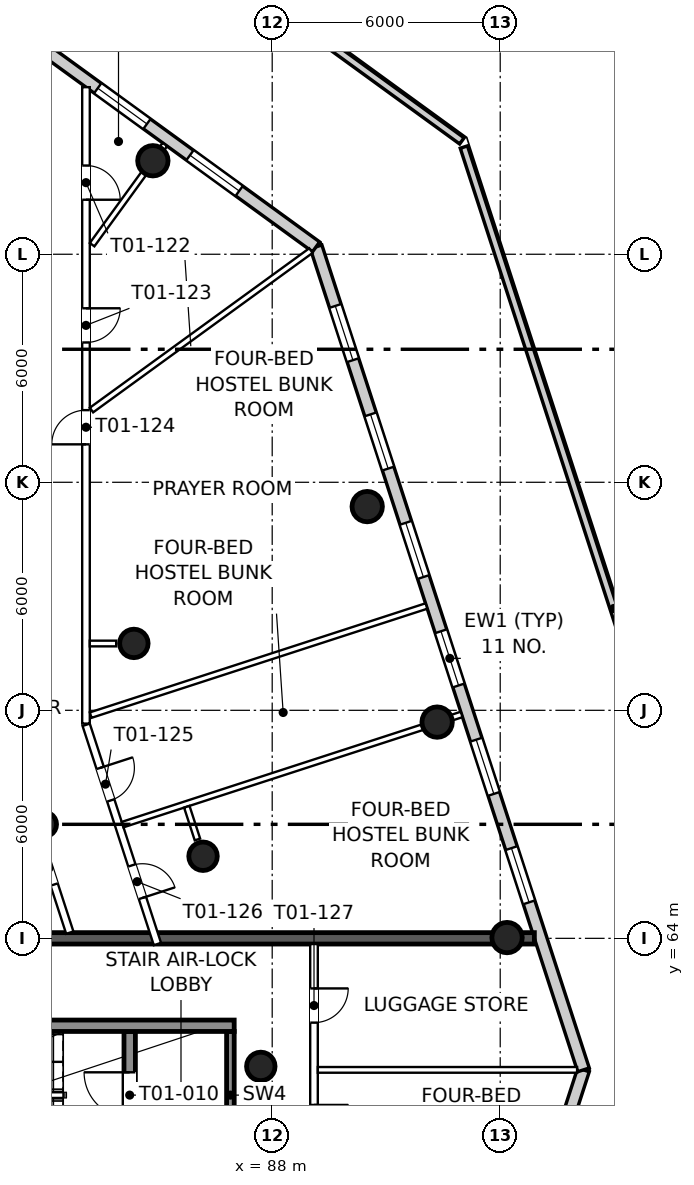
"""IFC4 building model, lengths in metres.
Left out: names, types, materials, properties, quantities, classifications, styles, units other than length and angle.
Written with IfcOpenShell. Run it as: python <this file> out.ifc"""

import sys

from ifc_helpers import new_model, si_unit, direction, frame, frame_2d, origin, origin_2d, place, context, subcontext, project, spatial, rectangle, circle, extrude, element, fill, save


model = new_model("IFC4")
c1 = context("Model", 3, precision=1e-05, world=origin(), true_north=direction((0.0, 1.0)))
c2 = subcontext(c1, "Body", "Model", "MODEL_VIEW")
j1 = project(units=[si_unit("LENGTHUNIT", "METRE"), si_unit("PLANEANGLEUNIT", "RADIAN")], contexts=[c1])
p1 = place(None, origin())
s1 = spatial("IfcSite", under=j1, at=p1, CompositionType="ELEMENT")
p2 = place(p1, origin())
s2 = spatial("IfcBuilding", under=s1, at=p2, CompositionType="ELEMENT")
p3 = place(p2, frame((0.0, 0.0, 39.0)))
s3 = spatial("IfcBuildingStorey", under=s2, at=p3, CompositionType="ELEMENT", Elevation=39.0)
for number, where, z_axis, x_axis in (
    (1, (94.18, 64.02, 0.0), (0.0, 0.0, 1.0), (1.0, 0.0, 0.0)),
    (2, (92.34, 69.69, 0.0), (0.0, 0.0, 1.0), (1.0, 0.0, 0.0)),
    (3, (90.5, 75.36, 0.0), (0.0, 0.0, 1.0), (1.0, 0.0, 0.0)),
    (4, (84.86, 84.46, 0.0), (0.0, 0.0, 1.0), (1.0, 0.0, 0.0)),
):
    element("IfcColumn", number, at=place(p3, frame(where, z_axis=z_axis, x_axis=x_axis)), inside=s3, PredefinedType="COLUMN", context=c2, shape_type="SweptSolid", body=[
        extrude(circle(Radius=0.4, at=origin_2d()), origin(), (0.0, 0.0, 1.0), 3.9),
    ])
for number, where, z_axis, x_axis in (
    (5, (87.7, 60.63, 0.0), (0.0, 0.0, 1.0), (1.0, 0.0, 0.0)),
    (6, (86.18, 66.16, 0.0), (0.0, 0.0, 1.0), (1.0, 0.0, 0.0)),
    (7, (84.36, 71.76, 0.0), (0.0, 0.0, 1.0), (1.0, 0.0, 0.0)),
):
    element("IfcColumn", number, at=place(p3, frame(where, z_axis=z_axis, x_axis=x_axis)), inside=s3, PredefinedType="COLUMN", context=c2, shape_type="SweptSolid", body=[
        extrude(circle(Radius=0.375, at=origin_2d()), origin(), (0.0, 0.0, 1.0), 3.9),
    ])
p4 = place(p3, frame((82.0, 67.0, 0.0), z_axis=(0.0, 0.0, 1.0), x_axis=(1.0, 0.0, 0.0)))
e8 = element("IfcColumn", 8, at=p4, inside=s3, PredefinedType="COLUMN", context=c2, shape_type="SweptSolid", body=[
    extrude(circle(Radius=0.325, at=origin_2d()), origin(), (0.0, 0.0, 1.0), 3.9),
])
p5 = place(p3, frame((93.223, 51.405, 0.0), z_axis=(0.0, 0.0, 1.0), x_axis=(0.309034915099, 0.951050693312, 0.0)))
e9 = element("IfcWall", 9, at=p5, inside=s3, PredefinedType="SOLIDWALL", context=c2, shape_type="SweptSolid", body=[
    extrude(rectangle(XDim=9.604, YDim=0.32, at=frame_2d((4.802, 0.0))), origin(), (0.0, 0.0, 1.0), 3.6),
])
p6 = place(p5, frame((2.502, 0.0, 0.9)))
e10 = element("IfcOpeningElement", 10, at=p6, cuts=e9, PredefinedType="OPENING", context=c2, shape_type="SweptSolid", body=[
    extrude(rectangle(XDim=1.6, YDim=1.8, at=frame_2d((0.8, 0.9))), frame((0.0, 0.17, 0.0), z_axis=(0.0, -1.0, 0.0), x_axis=(1.0, 0.0, 0.0)), (0.0, 0.0, 1.0), 0.34),
])
p7 = place(p5, frame((5.502, 0.0, 0.9)))
e11 = element("IfcOpeningElement", 11, at=p7, cuts=e9, PredefinedType="OPENING", context=c2, shape_type="SweptSolid", body=[
    extrude(rectangle(XDim=1.6, YDim=1.8, at=frame_2d((0.8, 0.9))), frame((0.0, 0.17, 0.0), z_axis=(0.0, -1.0, 0.0), x_axis=(1.0, 0.0, 0.0)), (0.0, 0.0, 1.0), 0.34),
])
p8 = place(p3, frame((96.191, 60.539, 0.0), z_axis=(0.0, 0.0, 1.0), x_axis=(-0.309016733543, 0.951056601045, 0.0)))
e12 = element("IfcWall", 12, at=p8, inside=s3, PredefinedType="SOLIDWALL", context=c2, shape_type="SweptSolid", body=[
    extrude(rectangle(XDim=22.77, YDim=0.32, at=frame_2d((11.385, 0.0))), origin(), (0.0, 0.0, 1.0), 3.6),
])
p9 = place(p8, frame((4.635, 0.0, 0.9)))
e13 = element("IfcOpeningElement", 13, at=p9, cuts=e12, PredefinedType="OPENING", context=c2, shape_type="SweptSolid", body=[
    extrude(rectangle(XDim=1.5, YDim=1.8, at=frame_2d((0.75, 0.9))), frame((0.0, 0.17, 0.0), z_axis=(0.0, -1.0, 0.0), x_axis=(1.0, 0.0, 0.0)), (0.0, 0.0, 1.0), 0.34),
])
p10 = place(p8, frame((7.635, 0.0, 0.9)))
e14 = element("IfcOpeningElement", 14, at=p10, cuts=e12, PredefinedType="OPENING", context=c2, shape_type="SweptSolid", body=[
    extrude(rectangle(XDim=1.5, YDim=1.8, at=frame_2d((0.75, 0.9))), frame((0.0, 0.17, 0.0), z_axis=(0.0, -1.0, 0.0), x_axis=(1.0, 0.0, 0.0)), (0.0, 0.0, 1.0), 0.34),
])
p11 = place(p8, frame((10.635, 0.0, 0.9)))
e15 = element("IfcOpeningElement", 15, at=p11, cuts=e12, PredefinedType="OPENING", context=c2, shape_type="SweptSolid", body=[
    extrude(rectangle(XDim=1.5, YDim=1.8, at=frame_2d((0.75, 0.9))), frame((0.0, 0.17, 0.0), z_axis=(0.0, -1.0, 0.0), x_axis=(1.0, 0.0, 0.0)), (0.0, 0.0, 1.0), 0.34),
])
p12 = place(p8, frame((13.635, 0.0, 0.9)))
e16 = element("IfcOpeningElement", 16, at=p12, cuts=e12, PredefinedType="OPENING", context=c2, shape_type="SweptSolid", body=[
    extrude(rectangle(XDim=1.5, YDim=1.8, at=frame_2d((0.75, 0.9))), frame((0.0, 0.17, 0.0), z_axis=(0.0, -1.0, 0.0), x_axis=(1.0, 0.0, 0.0)), (0.0, 0.0, 1.0), 0.34),
])
p13 = place(p8, frame((16.635, 0.0, 0.9)))
e17 = element("IfcOpeningElement", 17, at=p13, cuts=e12, PredefinedType="OPENING", context=c2, shape_type="SweptSolid", body=[
    extrude(rectangle(XDim=1.5, YDim=1.8, at=frame_2d((0.75, 0.9))), frame((0.0, 0.17, 0.0), z_axis=(0.0, -1.0, 0.0), x_axis=(1.0, 0.0, 0.0)), (0.0, 0.0, 1.0), 0.34),
])
p14 = place(p8, frame((19.635, 0.0, 0.9)))
e18 = element("IfcOpeningElement", 18, at=p14, cuts=e12, PredefinedType="OPENING", context=c2, shape_type="SweptSolid", body=[
    extrude(rectangle(XDim=1.5, YDim=1.8, at=frame_2d((0.75, 0.9))), frame((0.0, 0.17, 0.0), z_axis=(0.0, -1.0, 0.0), x_axis=(1.0, 0.0, 0.0)), (0.0, 0.0, 1.0), 0.34),
])
p15 = place(p3, frame((89.155, 82.195, 0.0), z_axis=(0.0, 0.0, 1.0), x_axis=(-0.809016299274, 0.587786209015, 0.0)))
e19 = element("IfcWall", 19, at=p15, inside=s3, PredefinedType="SOLIDWALL", context=c2, shape_type="SweptSolid", body=[
    extrude(rectangle(XDim=9.604, YDim=0.32, at=frame_2d((4.802, 0.0))), origin(), (0.0, 0.0, 1.0), 3.6),
])
p16 = place(p15, frame((2.502, 0.0, 0.9)))
e20 = element("IfcOpeningElement", 20, at=p16, cuts=e19, PredefinedType="OPENING", context=c2, shape_type="SweptSolid", body=[
    extrude(rectangle(XDim=1.6, YDim=1.8, at=frame_2d((0.8, 0.9))), frame((0.0, 0.17, 0.0), z_axis=(0.0, -1.0, 0.0), x_axis=(1.0, 0.0, 0.0)), (0.0, 0.0, 1.0), 0.34),
])
p17 = place(p15, frame((5.502, 0.0, 0.9)))
e21 = element("IfcOpeningElement", 21, at=p17, cuts=e19, PredefinedType="OPENING", context=c2, shape_type="SweptSolid", body=[
    extrude(rectangle(XDim=1.6, YDim=1.8, at=frame_2d((0.8, 0.9))), frame((0.0, 0.17, 0.0), z_axis=(0.0, -1.0, 0.0), x_axis=(1.0, 0.0, 0.0)), (0.0, 0.0, 1.0), 0.34),
])
p18 = place(p3, frame((100.933, 60.539, 0.0), z_axis=(0.0, 0.0, 1.0), x_axis=(-0.309020010983, -0.951055536134, 0.0)))
e22 = element("IfcWall", 22, at=p18, inside=s3, PredefinedType="SOLIDWALL", context=c2, shape_type="SweptSolid", body=[
    extrude(rectangle(XDim=12.535, YDim=0.2, at=frame_2d((6.268, 0.0))), origin(), (0.0, 0.0, 1.0), 1.1),
])
p19 = place(p3, frame((89.182, 87.75, 0.0), z_axis=(0.0, 0.0, 1.0), x_axis=(0.809016245047, -0.587786283652, 0.0)))
e23 = element("IfcWall", 23, at=p19, inside=s3, PredefinedType="SOLIDWALL", context=c2, shape_type="SweptSolid", body=[
    extrude(rectangle(XDim=4.709, YDim=0.2, at=frame_2d((2.354, 0.0))), origin(), (0.0, 0.0, 1.0), 1.1),
])
p20 = place(p3, frame((93.044, 84.82, 0.0), z_axis=(0.0, 0.0, 1.0), x_axis=(0.309015149374, -0.95105711577, 0.0)))
e24 = element("IfcWall", 24, at=p20, inside=s3, PredefinedType="SOLIDWALL", context=c2, shape_type="SweptSolid", body=[
    extrude(rectangle(XDim=25.531, YDim=0.2, at=frame_2d((12.765, 0.0))), origin(), (0.0, 0.0, 1.0), 1.1),
])
p21 = place(p3, frame((84.25, 58.2, 0.0), z_axis=(0.0, 0.0, 1.0), x_axis=(0.0, 1.0, 0.0)))
e25 = element("IfcWall", 25, at=p21, inside=s3, PredefinedType="SHEAR", context=c2, shape_type="SweptSolid", body=[
    extrude(rectangle(XDim=3.35, YDim=0.3, at=frame_2d((1.675, 0.0))), origin(), (0.0, 0.0, 1.0), 3.9),
])
p22 = place(p21, frame((1.075, 0.0, 0.0)))
e26 = element("IfcOpeningElement", 26, at=p22, cuts=e25, PredefinedType="OPENING", context=c2, shape_type="SweptSolid", body=[
    extrude(rectangle(XDim=1.2, YDim=2.1, at=frame_2d((0.6, 1.05))), frame((0.0, 0.16, 0.0), z_axis=(0.0, -1.0, 0.0), x_axis=(1.0, 0.0, 0.0)), (0.0, 0.0, 1.0), 0.32),
])
p23 = place(p3, frame((86.9, 58.2, 0.0), z_axis=(0.0, 0.0, 1.0), x_axis=(0.0, 1.0, 0.0)))
e27 = element("IfcWall", 27, at=p23, inside=s3, PredefinedType="SHEAR", context=c2, shape_type="SweptSolid", body=[
    extrude(rectangle(XDim=3.35, YDim=0.2, at=frame_2d((1.675, 0.0))), origin(), (0.0, 0.0, 1.0), 3.9),
])
p24 = place(p3, frame((75.1, 61.7, 0.0), z_axis=(0.0, 0.0, 1.0), x_axis=(1.0, 0.0, 0.0)))
e28 = element("IfcWall", 28, at=p24, inside=s3, PredefinedType="SHEAR", context=c2, shape_type="SweptSolid", body=[
    extrude(rectangle(XDim=11.9, YDim=0.3, at=frame_2d((5.95, 0.0))), origin(), (0.0, 0.0, 1.0), 3.9),
])
p25 = place(p3, frame((45.101, 64.0, 0.0), z_axis=(0.0, 0.0, 1.0), x_axis=(1.0, 0.0, 0.0)))
e29 = element("IfcWall", 29, at=p25, inside=s3, PredefinedType="PARTITIONING", context=c2, shape_type="SweptSolid", body=[
    extrude(rectangle(XDim=49.797, YDim=0.3, at=frame_2d((24.899, 0.0))), origin(), (0.0, 0.0, 1.0), 2.9),
])
p26 = place(p25, frame((16.433, 0.0, 0.0)))
e30 = element("IfcOpeningElement", 30, at=p26, cuts=e29, PredefinedType="OPENING", context=c2, shape_type="SweptSolid", body=[
    extrude(rectangle(XDim=2.0, YDim=2.1, at=frame_2d((1.0, 1.05))), frame((0.0, 0.16, 0.0), z_axis=(0.0, -1.0, 0.0), x_axis=(1.0, 0.0, 0.0)), (0.0, 0.0, 1.0), 0.32),
])
p27 = place(p25, frame((31.364, 0.0, 0.0)))
e31 = element("IfcOpeningElement", 31, at=p27, cuts=e29, PredefinedType="OPENING", context=c2, shape_type="SweptSolid", body=[
    extrude(rectangle(XDim=2.0, YDim=2.1, at=frame_2d((1.0, 1.05))), frame((0.0, 0.16, 0.0), z_axis=(0.0, -1.0, 0.0), x_axis=(1.0, 0.0, 0.0)), (0.0, 0.0, 1.0), 0.32),
])
p28 = place(p3, frame((83.1, 86.396, 0.0), z_axis=(0.0, 0.0, 1.0), x_axis=(0.0, -1.0, 0.0)))
e32 = element("IfcWall", 32, at=p28, inside=s3, PredefinedType="PARTITIONING", context=c2, shape_type="SweptSolid", body=[
    extrude(rectangle(XDim=16.746, YDim=0.2, at=frame_2d((8.373, 0.0))), origin(), (0.0, 0.0, 1.0), 3.0),
])
p29 = place(p28, frame((2.062, 0.0, 0.0)))
e33 = element("IfcOpeningElement", 33, at=p29, cuts=e32, PredefinedType="OPENING", context=c2, shape_type="SweptSolid", body=[
    extrude(rectangle(XDim=0.9, YDim=2.1, at=frame_2d((0.45, 1.05))), frame((0.0, 0.11, 0.0), z_axis=(0.0, -1.0, 0.0), x_axis=(1.0, 0.0, 0.0)), (0.0, 0.0, 1.0), 0.22),
])
p30 = place(p28, frame((5.818, 0.0, 0.0)))
e34 = element("IfcOpeningElement", 34, at=p30, cuts=e32, PredefinedType="OPENING", context=c2, shape_type="SweptSolid", body=[
    extrude(rectangle(XDim=0.9, YDim=2.1, at=frame_2d((0.45, 1.05))), frame((0.0, 0.11, 0.0), z_axis=(0.0, -1.0, 0.0), x_axis=(1.0, 0.0, 0.0)), (0.0, 0.0, 1.0), 0.22),
])
p31 = place(p28, frame((8.498, 0.0, 0.0)))
e35 = element("IfcOpeningElement", 35, at=p31, cuts=e32, PredefinedType="OPENING", context=c2, shape_type="SweptSolid", body=[
    extrude(rectangle(XDim=0.9, YDim=2.1, at=frame_2d((0.45, 1.05))), frame((0.0, 0.11, 0.0), z_axis=(0.0, -1.0, 0.0), x_axis=(1.0, 0.0, 0.0)), (0.0, 0.0, 1.0), 0.22),
])
p32 = place(p3, frame((83.105, 69.619, 0.0), z_axis=(0.0, 0.0, 1.0), x_axis=(0.309010538589, -0.951058613883, 0.0)))
e36 = element("IfcWall", 36, at=p32, inside=s3, PredefinedType="PARTITIONING", context=c2, shape_type="SweptSolid", body=[
    extrude(rectangle(XDim=6.066, YDim=0.2, at=frame_2d((3.033, 0.0))), origin(), (0.0, 0.0, 1.0), 3.6),
])
p33 = place(p32, frame((1.193, 0.0, 0.0)))
e37 = element("IfcOpeningElement", 37, at=p33, cuts=e36, PredefinedType="OPENING", context=c2, shape_type="SweptSolid", body=[
    extrude(rectangle(XDim=0.9, YDim=2.1, at=frame_2d((0.45, 1.05))), frame((0.0, 0.11, 0.0), z_axis=(0.0, -1.0, 0.0), x_axis=(1.0, 0.0, 0.0)), (0.0, 0.0, 1.0), 0.22),
])
p34 = place(p32, frame((3.89, 0.0, 0.0)))
e38 = element("IfcOpeningElement", 38, at=p34, cuts=e36, PredefinedType="OPENING", context=c2, shape_type="SweptSolid", body=[
    extrude(rectangle(XDim=0.9, YDim=2.1, at=frame_2d((0.45, 1.05))), frame((0.0, 0.11, 0.0), z_axis=(0.0, -1.0, 0.0), x_axis=(1.0, 0.0, 0.0)), (0.0, 0.0, 1.0), 0.22),
])
p35 = place(p3, frame((89.1, 63.85, 0.0), z_axis=(0.0, 0.0, 1.0), x_axis=(0.0, -1.0, 0.0)))
e39 = element("IfcWall", 39, at=p35, inside=s3, PredefinedType="PARTITIONING", context=c2, shape_type="SweptSolid", body=[
    extrude(rectangle(XDim=7.95, YDim=0.2, at=frame_2d((3.975, 0.0))), origin(), (0.0, 0.0, 1.0), 3.6),
])
p36 = place(p35, frame((4.233, 0.0, 0.0)))
e40 = element("IfcOpeningElement", 40, at=p36, cuts=e39, PredefinedType="OPENING", context=c2, shape_type="SweptSolid", body=[
    extrude(rectangle(XDim=0.9, YDim=2.1, at=frame_2d((0.45, 1.05))), frame((0.0, 0.11, 0.0), z_axis=(0.0, -1.0, 0.0), x_axis=(1.0, 0.0, 0.0)), (0.0, 0.0, 1.0), 0.22),
])
p37 = place(p35, frame((1.168, 0.0, 0.0)))
e41 = element("IfcOpeningElement", 41, at=p37, cuts=e39, PredefinedType="OPENING", context=c2, shape_type="SweptSolid", body=[
    extrude(rectangle(XDim=0.9, YDim=2.1, at=frame_2d((0.45, 1.05))), frame((0.0, 0.11, 0.0), z_axis=(0.0, -1.0, 0.0), x_axis=(1.0, 0.0, 0.0)), (0.0, 0.0, 1.0), 0.22),
])
p38 = place(p3, frame((82.674, 64.15, 0.0), z_axis=(0.0, 0.0, 1.0), x_axis=(-0.309031112369, 0.951051928965, 0.0)))
e42 = element("IfcWall", 42, at=p38, inside=s3, PredefinedType="PARTITIONING", context=c2, shape_type="SweptSolid", body=[
    extrude(rectangle(XDim=4.922, YDim=0.2, at=frame_2d((2.461, 0.0))), origin(), (0.0, 0.0, 1.0), 3.6),
])
p39 = place(p38, frame((1.331, 0.0, 0.0)))
e43 = element("IfcOpeningElement", 43, at=p39, cuts=e42, PredefinedType="OPENING", context=c2, shape_type="SweptSolid", body=[
    extrude(rectangle(XDim=0.9, YDim=2.1, at=frame_2d((0.45, 1.05))), frame((0.0, 0.11, 0.0), z_axis=(0.0, -1.0, 0.0), x_axis=(1.0, 0.0, 0.0)), (0.0, 0.0, 1.0), 0.22),
])
p40 = place(p3, frame((96.023, 60.539, 0.0), z_axis=(0.0, 0.0, 1.0), x_axis=(-1.0, 0.0, 0.0)))
e44 = element("IfcWall", 44, at=p40, inside=s3, PredefinedType="PARTITIONING", context=c2, shape_type="SweptSolid", body=[
    extrude(rectangle(XDim=6.823, YDim=0.15, at=frame_2d((3.412, 0.0))), origin(), (0.0, 0.0, 1.0), 3.1),
])
p41 = place(p3, frame((89.019, 82.096, 0.0), z_axis=(0.0, 0.0, 1.0), x_axis=(-0.808999272552, -0.587809643516, 0.0)))
e45 = element("IfcWall", 45, at=p41, inside=s3, PredefinedType="PARTITIONING", context=c2, shape_type="SweptSolid", body=[
    extrude(rectangle(XDim=7.138, YDim=0.15, at=frame_2d((3.569, 0.0))), origin(), (0.0, 0.0, 1.0), 2.9),
])
p42 = place(p3, frame((92.985, 69.891, 0.0), z_axis=(0.0, 0.0, 1.0), x_axis=(-0.951060843481, -0.309003676349, 0.0)))
e46 = element("IfcWall", 46, at=p42, inside=s3, PredefinedType="PARTITIONING", context=c2, shape_type="SweptSolid", body=[
    extrude(rectangle(XDim=9.38, YDim=0.15, at=frame_2d((4.69, 0.0))), origin(), (0.0, 0.0, 1.0), 3.0),
])
p43 = place(p3, frame((92.058, 72.744, 0.0), z_axis=(0.0, 0.0, 1.0), x_axis=(-0.951060719187, -0.309004058904, 0.0)))
e47 = element("IfcWall", 47, at=p43, inside=s3, PredefinedType="PARTITIONING", context=c2, shape_type="SweptSolid", body=[
    extrude(rectangle(XDim=9.289, YDim=0.15, at=frame_2d((4.645, 0.0))), origin(), (0.0, 0.0, 1.0), 3.0),
])
p44 = place(p3, frame((85.176, 84.888, 0.0), z_axis=(0.0, 0.0, 1.0), x_axis=(-0.587775139739, -0.809024341479, 0.0)))
e48 = element("IfcWall", 48, at=p44, inside=s3, PredefinedType="PARTITIONING", context=c2, shape_type="SweptSolid", body=[
    extrude(rectangle(XDim=3.259, YDim=0.15, at=frame_2d((1.629, 0.0))), origin(), (0.0, 0.0, 1.0), 3.6),
])
p45 = place(p3, frame((86.033, 66.601, 0.0), z_axis=(0.0, 0.0, 1.0), x_axis=(-0.308939772629, 0.951081603695, 0.0)))
e49 = element("IfcWall", 49, at=p45, inside=s3, PredefinedType="PARTITIONING", context=c2, shape_type="SweptSolid", body=[
    extrude(rectangle(XDim=0.906, YDim=0.15, at=frame_2d((0.453, 0.0))), origin(), (0.0, 0.0, 1.0), 3.0),
])
p46 = place(p3, frame((83.895, 71.758, 0.0), z_axis=(0.0, 0.0, 1.0), x_axis=(-1.0, 0.0, 0.0)))
e50 = element("IfcWall", 50, at=p46, inside=s3, PredefinedType="PARTITIONING", context=c2, shape_type="SweptSolid", body=[
    extrude(rectangle(XDim=0.695, YDim=0.15, at=frame_2d((0.348, 0.0))), origin(), (0.0, 0.0, 1.0), 3.0),
])
p47 = place(p9, origin())
e51 = element("IfcWindow", 51, at=p47, inside=s3, PartitioningType="SINGLE_PANEL", PredefinedType="WINDOW", context=c2, shape_type="SweptSolid", body=[
    extrude(rectangle(XDim=1.5, YDim=1.8, at=frame_2d((0.75, 0.9))), frame((0.0, 0.07, 0.0), z_axis=(0.0, -1.0, 0.0), x_axis=(1.0, 0.0, 0.0)), (0.0, 0.0, 1.0), 0.06),
])
fill(e13, e51)
p48 = place(p10, origin())
e52 = element("IfcWindow", 52, at=p48, inside=s3, PartitioningType="SINGLE_PANEL", PredefinedType="WINDOW", context=c2, shape_type="SweptSolid", body=[
    extrude(rectangle(XDim=1.5, YDim=1.8, at=frame_2d((0.75, 0.9))), frame((0.0, 0.07, 0.0), z_axis=(0.0, -1.0, 0.0), x_axis=(1.0, 0.0, 0.0)), (0.0, 0.0, 1.0), 0.06),
])
fill(e14, e52)
p49 = place(p11, origin())
e53 = element("IfcWindow", 53, at=p49, inside=s3, PartitioningType="SINGLE_PANEL", PredefinedType="WINDOW", context=c2, shape_type="SweptSolid", body=[
    extrude(rectangle(XDim=1.5, YDim=1.8, at=frame_2d((0.75, 0.9))), frame((0.0, 0.07, 0.0), z_axis=(0.0, -1.0, 0.0), x_axis=(1.0, 0.0, 0.0)), (0.0, 0.0, 1.0), 0.06),
])
fill(e15, e53)
p50 = place(p12, origin())
e54 = element("IfcWindow", 54, at=p50, inside=s3, PartitioningType="SINGLE_PANEL", PredefinedType="WINDOW", context=c2, shape_type="SweptSolid", body=[
    extrude(rectangle(XDim=1.5, YDim=1.8, at=frame_2d((0.75, 0.9))), frame((0.0, 0.07, 0.0), z_axis=(0.0, -1.0, 0.0), x_axis=(1.0, 0.0, 0.0)), (0.0, 0.0, 1.0), 0.06),
])
fill(e16, e54)
p51 = place(p13, origin())
e55 = element("IfcWindow", 55, at=p51, inside=s3, PartitioningType="SINGLE_PANEL", PredefinedType="WINDOW", context=c2, shape_type="SweptSolid", body=[
    extrude(rectangle(XDim=1.5, YDim=1.8, at=frame_2d((0.75, 0.9))), frame((0.0, 0.07, 0.0), z_axis=(0.0, -1.0, 0.0), x_axis=(1.0, 0.0, 0.0)), (0.0, 0.0, 1.0), 0.06),
])
fill(e17, e55)
p52 = place(p14, origin())
e56 = element("IfcWindow", 56, at=p52, inside=s3, PartitioningType="SINGLE_PANEL", PredefinedType="WINDOW", context=c2, shape_type="SweptSolid", body=[
    extrude(rectangle(XDim=1.5, YDim=1.8, at=frame_2d((0.75, 0.9))), frame((0.0, 0.07, 0.0), z_axis=(0.0, -1.0, 0.0), x_axis=(1.0, 0.0, 0.0)), (0.0, 0.0, 1.0), 0.06),
])
fill(e18, e56)
p53 = place(p16, origin())
e57 = element("IfcWindow", 57, at=p53, inside=s3, PartitioningType="SINGLE_PANEL", PredefinedType="WINDOW", context=c2, shape_type="SweptSolid", body=[
    extrude(rectangle(XDim=1.6, YDim=1.8, at=frame_2d((0.8, 0.9))), frame((0.0, 0.07, 0.0), z_axis=(0.0, -1.0, 0.0), x_axis=(1.0, 0.0, 0.0)), (0.0, 0.0, 1.0), 0.06),
])
fill(e20, e57)
p54 = place(p17, origin())
e58 = element("IfcWindow", 58, at=p54, inside=s3, PartitioningType="SINGLE_PANEL", PredefinedType="WINDOW", context=c2, shape_type="SweptSolid", body=[
    extrude(rectangle(XDim=1.6, YDim=1.8, at=frame_2d((0.8, 0.9))), frame((0.0, 0.07, 0.0), z_axis=(0.0, -1.0, 0.0), x_axis=(1.0, 0.0, 0.0)), (0.0, 0.0, 1.0), 0.06),
])
fill(e21, e58)
p55 = place(p22, origin())
e59 = element("IfcDoor", 59, at=p55, inside=s3, OperationType="SINGLE_SWING_RIGHT", PredefinedType="DOOR", context=c2, shape_type="SweptSolid", body=[
    extrude(rectangle(XDim=1.2, YDim=2.1, at=frame_2d((0.6, 1.05))), frame((0.0, 0.025, 0.0), z_axis=(0.0, -1.0, 0.0), x_axis=(1.0, 0.0, 0.0)), (0.0, 0.0, 1.0), 0.05),
])
fill(e26, e59)
p56 = place(p29, origin())
e60 = element("IfcDoor", 60, at=p56, inside=s3, OperationType="SINGLE_SWING_RIGHT", PredefinedType="DOOR", context=c2, shape_type="SweptSolid", body=[
    extrude(rectangle(XDim=0.9, YDim=2.1, at=frame_2d((0.45, 1.05))), frame((0.0, 0.025, 0.0), z_axis=(0.0, -1.0, 0.0), x_axis=(1.0, 0.0, 0.0)), (0.0, 0.0, 1.0), 0.05),
])
fill(e33, e60)
p57 = place(p30, origin())
e61 = element("IfcDoor", 61, at=p57, inside=s3, OperationType="SINGLE_SWING_LEFT", PredefinedType="DOOR", context=c2, shape_type="SweptSolid", body=[
    extrude(rectangle(XDim=0.9, YDim=2.1, at=frame_2d((0.45, 1.05))), frame((0.0, 0.025, 0.0), z_axis=(0.0, -1.0, 0.0), x_axis=(1.0, 0.0, 0.0)), (0.0, 0.0, 1.0), 0.05),
])
fill(e34, e61)
p58 = place(p31, frame((0.9, 0.0, 0.0), z_axis=(0.0, 0.0, 1.0), x_axis=(-1.0, 0.0, 0.0)))
e62 = element("IfcDoor", 62, at=p58, inside=s3, OperationType="SINGLE_SWING_LEFT", PredefinedType="DOOR", context=c2, shape_type="SweptSolid", body=[
    extrude(rectangle(XDim=0.9, YDim=2.1, at=frame_2d((0.45, 1.05))), frame((0.0, 0.025, 0.0), z_axis=(0.0, -1.0, 0.0), x_axis=(1.0, 0.0, 0.0)), (0.0, 0.0, 1.0), 0.05),
])
fill(e35, e62)
p59 = place(p33, origin())
e63 = element("IfcDoor", 63, at=p59, inside=s3, OperationType="SINGLE_SWING_LEFT", PredefinedType="DOOR", context=c2, shape_type="SweptSolid", body=[
    extrude(rectangle(XDim=0.9, YDim=2.1, at=frame_2d((0.45, 1.05))), frame((0.0, 0.025, 0.0), z_axis=(0.0, -1.0, 0.0), x_axis=(1.0, 0.0, 0.0)), (0.0, 0.0, 1.0), 0.05),
])
fill(e37, e63)
p60 = place(p34, origin())
e64 = element("IfcDoor", 64, at=p60, inside=s3, OperationType="SINGLE_SWING_RIGHT", PredefinedType="DOOR", context=c2, shape_type="SweptSolid", body=[
    extrude(rectangle(XDim=0.9, YDim=2.1, at=frame_2d((0.45, 1.05))), frame((0.0, 0.025, 0.0), z_axis=(0.0, -1.0, 0.0), x_axis=(1.0, 0.0, 0.0)), (0.0, 0.0, 1.0), 0.05),
])
fill(e38, e64)
p61 = place(p37, origin())
e65 = element("IfcDoor", 65, at=p61, inside=s3, OperationType="SINGLE_SWING_LEFT", PredefinedType="DOOR", context=c2, shape_type="SweptSolid", body=[
    extrude(rectangle(XDim=0.9, YDim=2.1, at=frame_2d((0.45, 1.05))), frame((0.0, 0.025, 0.0), z_axis=(0.0, -1.0, 0.0), x_axis=(1.0, 0.0, 0.0)), (0.0, 0.0, 1.0), 0.05),
])
fill(e41, e65)
p62 = place(p39, origin())
e66 = element("IfcDoor", 66, at=p62, inside=s3, OperationType="SINGLE_SWING_RIGHT", PredefinedType="DOOR", context=c2, shape_type="SweptSolid", body=[
    extrude(rectangle(XDim=0.9, YDim=2.1, at=frame_2d((0.45, 1.05))), frame((0.0, 0.025, 0.0), z_axis=(0.0, -1.0, 0.0), x_axis=(1.0, 0.0, 0.0)), (0.0, 0.0, 1.0), 0.05),
])
fill(e43, e66)
save(model, sys.argv[1])
